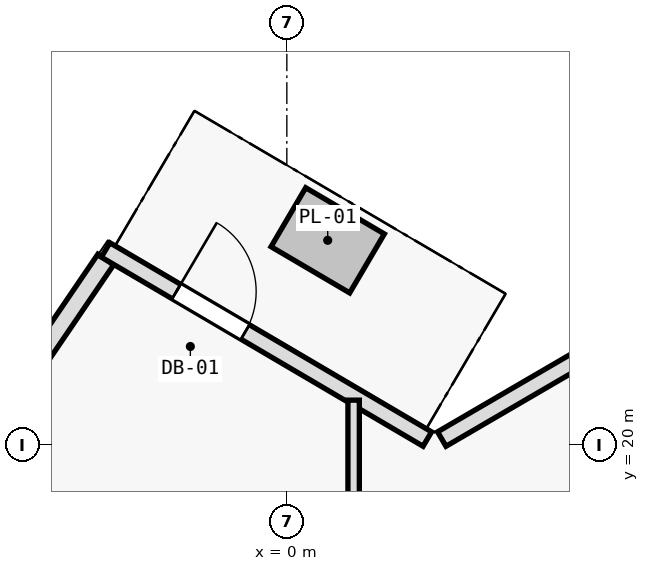
"""IFC4 building model, lengths in metres.
Left out: names, types, materials, properties, quantities, classifications, styles, units other than length and angle.
Written with IfcOpenShell. Run it as: python <this file> out.ifc"""

import sys

from ifc_helpers import new_model, si_unit, direction, frame, frame_2d, origin, place, context, subcontext, project, spatial, rectangle, extrude, element, fill, save


model = new_model("IFC4")
c1 = context("Model", 3, precision=1e-05, world=origin(), true_north=direction((0.0, 1.0)))
c2 = subcontext(c1, "Body", "Model", "MODEL_VIEW")
j1 = project(units=[si_unit("LENGTHUNIT", "METRE"), si_unit("PLANEANGLEUNIT", "RADIAN")], contexts=[c1])
p1 = place(None, origin())
s1 = spatial("IfcSite", under=j1, at=p1, CompositionType="ELEMENT")
p2 = place(p1, origin())
s2 = spatial("IfcBuilding", under=s1, at=p2, CompositionType="ELEMENT")
p3 = place(p2, frame((0.0, 0.0, 153.0)))
s3 = spatial("IfcBuildingStorey", under=s2, at=p3, CompositionType="ELEMENT", Elevation=153.0)
p4 = place(p3, frame((-8.75, 13.081, 0.0), z_axis=(0.0, 0.0, 1.0), x_axis=(0.562463958751, 0.82682180372, 0.0)))
e1 = element("IfcWall", 1, at=p4, inside=s3, PredefinedType="SOLIDWALL", context=c2, shape_type="SweptSolid", body=[
    extrude(rectangle(XDim=11.322, YDim=0.25, at=frame_2d((5.661, 0.0))), origin(), (0.0, 0.0, 1.0), 3.35),
])
p5 = place(p4, frame((4.961, 0.0, 0.62)))
e2 = element("IfcOpeningElement", 2, at=p5, cuts=e1, PredefinedType="OPENING", context=c2, shape_type="SweptSolid", body=[
    extrude(rectangle(XDim=1.4, YDim=2.0, at=frame_2d((0.7, 1.0))), frame((0.0, 0.135, 0.0), z_axis=(0.0, -1.0, 0.0), x_axis=(1.0, 0.0, 0.0)), (0.0, 0.0, 1.0), 0.27),
])
p6 = place(p3, frame((2.039, 20.079, 0.0), z_axis=(0.0, 0.0, 1.0), x_axis=(0.86398603623, 0.503515768571, 0.0)))
e3 = element("IfcWall", 3, at=p6, inside=s3, PredefinedType="SOLIDWALL", context=c2, shape_type="SweptSolid", body=[
    extrude(rectangle(XDim=4.444, YDim=0.22, at=frame_2d((2.222, 0.0))), origin(), (0.0, 0.0, 1.0), 3.35),
])
p7 = place(p3, frame((-2.385, 22.567, 0.0), z_axis=(0.0, 0.0, 1.0), x_axis=(0.8621258938, -0.506694131839, 0.0)))
e4 = element("IfcWall", 4, at=p7, inside=s3, PredefinedType="SOLIDWALL", context=c2, shape_type="SweptSolid", body=[
    extrude(rectangle(XDim=4.91, YDim=0.22, at=frame_2d((2.455, 0.0))), origin(), (0.0, 0.0, 1.0), 3.35),
])
p8 = place(p7, frame((1.08, 0.0, 0.0)))
e5 = element("IfcOpeningElement", 5, at=p8, cuts=e4, PredefinedType="OPENING", context=c2, shape_type="SweptSolid", body=[
    extrude(rectangle(XDim=1.05, YDim=2.15, at=frame_2d((0.525, 1.075))), frame((0.0, 0.12, 0.0), z_axis=(0.0, -1.0, 0.0), x_axis=(1.0, 0.0, 0.0)), (0.0, 0.0, 1.0), 0.24),
])
p9 = place(p3, frame((0.879, 12.42, 0.0), z_axis=(0.0, 0.0, 1.0), x_axis=(0.0, 1.0, 0.0)))
e6 = element("IfcWall", 6, at=p9, inside=s3, PredefinedType="PARTITIONING", context=c2, shape_type="SweptSolid", body=[
    extrude(rectangle(XDim=8.171, YDim=0.15, at=frame_2d((4.086, 0.0))), origin(), (0.0, 0.0, 1.0), 2.885),
])
p10 = place(p8, origin())
e7 = element("IfcDoor", 7, at=p10, inside=s3, OperationType="SINGLE_SWING_LEFT", PredefinedType="DOOR", context=c2, shape_type="SweptSolid", body=[
    extrude(rectangle(XDim=1.05, YDim=2.15, at=frame_2d((0.525, 1.075))), frame((0.0, 0.025, 0.0), z_axis=(0.0, -1.0, 0.0), x_axis=(1.0, 0.0, 0.0)), (0.0, 0.0, 1.0), 0.05),
])
fill(e5, e7)
save(model, sys.argv[1])
